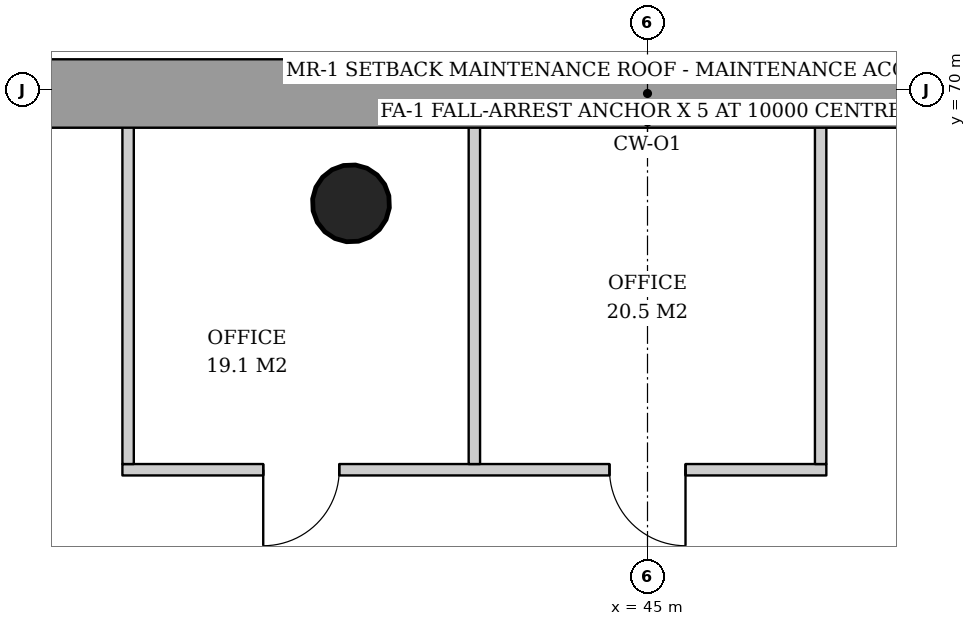
"""IFC4 building model, lengths in metres.
Left out: names, types, materials, properties, quantities, classifications, styles, units other than length and angle.
Written with IfcOpenShell. Run it as: python <this file> out.ifc"""

import sys

from ifc_helpers import new_model, si_unit, direction, frame, frame_2d, origin, origin_2d, place, context, subcontext, project, spatial, rectangle, hollow_circle, extrude, element, fill, save


model = new_model("IFC4")
c1 = context("Model", 3, precision=1e-05, world=origin(), true_north=direction((0.0, 1.0)))
c2 = subcontext(c1, "Body", "Model", "MODEL_VIEW")
j1 = project(units=[si_unit("LENGTHUNIT", "METRE"), si_unit("PLANEANGLEUNIT", "RADIAN")], contexts=[c1])
p1 = place(None, origin())
s1 = spatial("IfcSite", under=j1, at=p1, CompositionType="ELEMENT")
p2 = place(p1, origin())
s2 = spatial("IfcBuilding", under=s1, at=p2, CompositionType="ELEMENT")
p3 = place(p2, frame((0.0, 0.0, 66.6)))
s3 = spatial("IfcBuildingStorey", under=s2, at=p3, CompositionType="ELEMENT", Elevation=66.6)
p4 = place(p3, frame((41.091, 68.543, 0.0), z_axis=(0.006421664629, -0.031979889852, 0.99946788286), x_axis=(0.980428942348, 0.196873281596, 0.0)))
e1 = element("IfcColumn", 1, at=p4, inside=s3, PredefinedType="COLUMN", context=c2, shape_type="SweptSolid", body=[
    extrude(hollow_circle(Radius=0.508, WallThickness=0.04, at=origin_2d()), origin(), (0.0, 0.0, 1.0), 3.802),
])
p5 = place(p3, frame((47.353, 65.0, 0.0), z_axis=(0.0, 0.0, 1.0), x_axis=(-1.0, 0.0, 0.0)))
e2 = element("IfcWall", 2, at=p5, inside=s3, PredefinedType="PARTITIONING", context=c2, shape_type="SweptSolid", body=[
    extrude(rectangle(XDim=9.261, YDim=0.15, at=frame_2d((4.631, 0.0))), origin(), (0.0, 0.0, 1.0), 2.85),
])
p6 = place(p5, frame((1.853, 0.0, 0.0)))
e3 = element("IfcOpeningElement", 3, at=p6, cuts=e2, PredefinedType="OPENING", context=c2, shape_type="SweptSolid", body=[
    extrude(rectangle(XDim=1.0, YDim=2.1, at=frame_2d((0.5, 1.05))), frame((0.0, 0.085, 0.0), z_axis=(0.0, -1.0, 0.0), x_axis=(1.0, 0.0, 0.0)), (0.0, 0.0, 1.0), 0.17),
])
p7 = place(p5, frame((6.408, 0.0, 0.0)))
e4 = element("IfcOpeningElement", 4, at=p7, cuts=e2, PredefinedType="OPENING", context=c2, shape_type="SweptSolid", body=[
    extrude(rectangle(XDim=1.0, YDim=2.1, at=frame_2d((0.5, 1.05))), frame((0.0, 0.085, 0.0), z_axis=(0.0, -1.0, 0.0), x_axis=(1.0, 0.0, 0.0)), (0.0, 0.0, 1.0), 0.17),
])
for number, where, z_axis, x_axis in (
    (5, (47.278, 65.075, 0.0), (0.0, 0.0, 1.0), (0.0, 1.0, 0.0)),
    (6, (42.722, 65.075, 0.0), (0.0, 0.0, 1.0), (0.0, 1.0, 0.0)),
    (7, (38.167, 65.075, 0.0), (0.0, 0.0, 1.0), (0.0, 1.0, 0.0)),
):
    element("IfcWall", number, at=place(p3, frame(where, z_axis=z_axis, x_axis=x_axis)), inside=s3, PredefinedType="PARTITIONING", context=c2, shape_type="SweptSolid", body=[
        extrude(rectangle(XDim=4.465, YDim=0.15, at=frame_2d((2.232, 0.0))), origin(), (0.0, 0.0, 1.0), 3.02),
    ])
p8 = place(p6, origin())
e8 = element("IfcDoor", 8, at=p8, inside=s3, OperationType="SINGLE_SWING_LEFT", PredefinedType="DOOR", context=c2, shape_type="SweptSolid", body=[
    extrude(rectangle(XDim=1.0, YDim=2.1, at=frame_2d((0.5, 1.05))), frame((0.0, 0.025, 0.0), z_axis=(0.0, -1.0, 0.0), x_axis=(1.0, 0.0, 0.0)), (0.0, 0.0, 1.0), 0.05),
])
fill(e3, e8)
p9 = place(p7, origin())
e9 = element("IfcDoor", 9, at=p9, inside=s3, OperationType="SINGLE_SWING_RIGHT", PredefinedType="DOOR", context=c2, shape_type="SweptSolid", body=[
    extrude(rectangle(XDim=1.0, YDim=2.1, at=frame_2d((0.5, 1.05))), frame((0.0, 0.025, 0.0), z_axis=(0.0, -1.0, 0.0), x_axis=(1.0, 0.0, 0.0)), (0.0, 0.0, 1.0), 0.05),
])
fill(e4, e9)
save(model, sys.argv[1])
